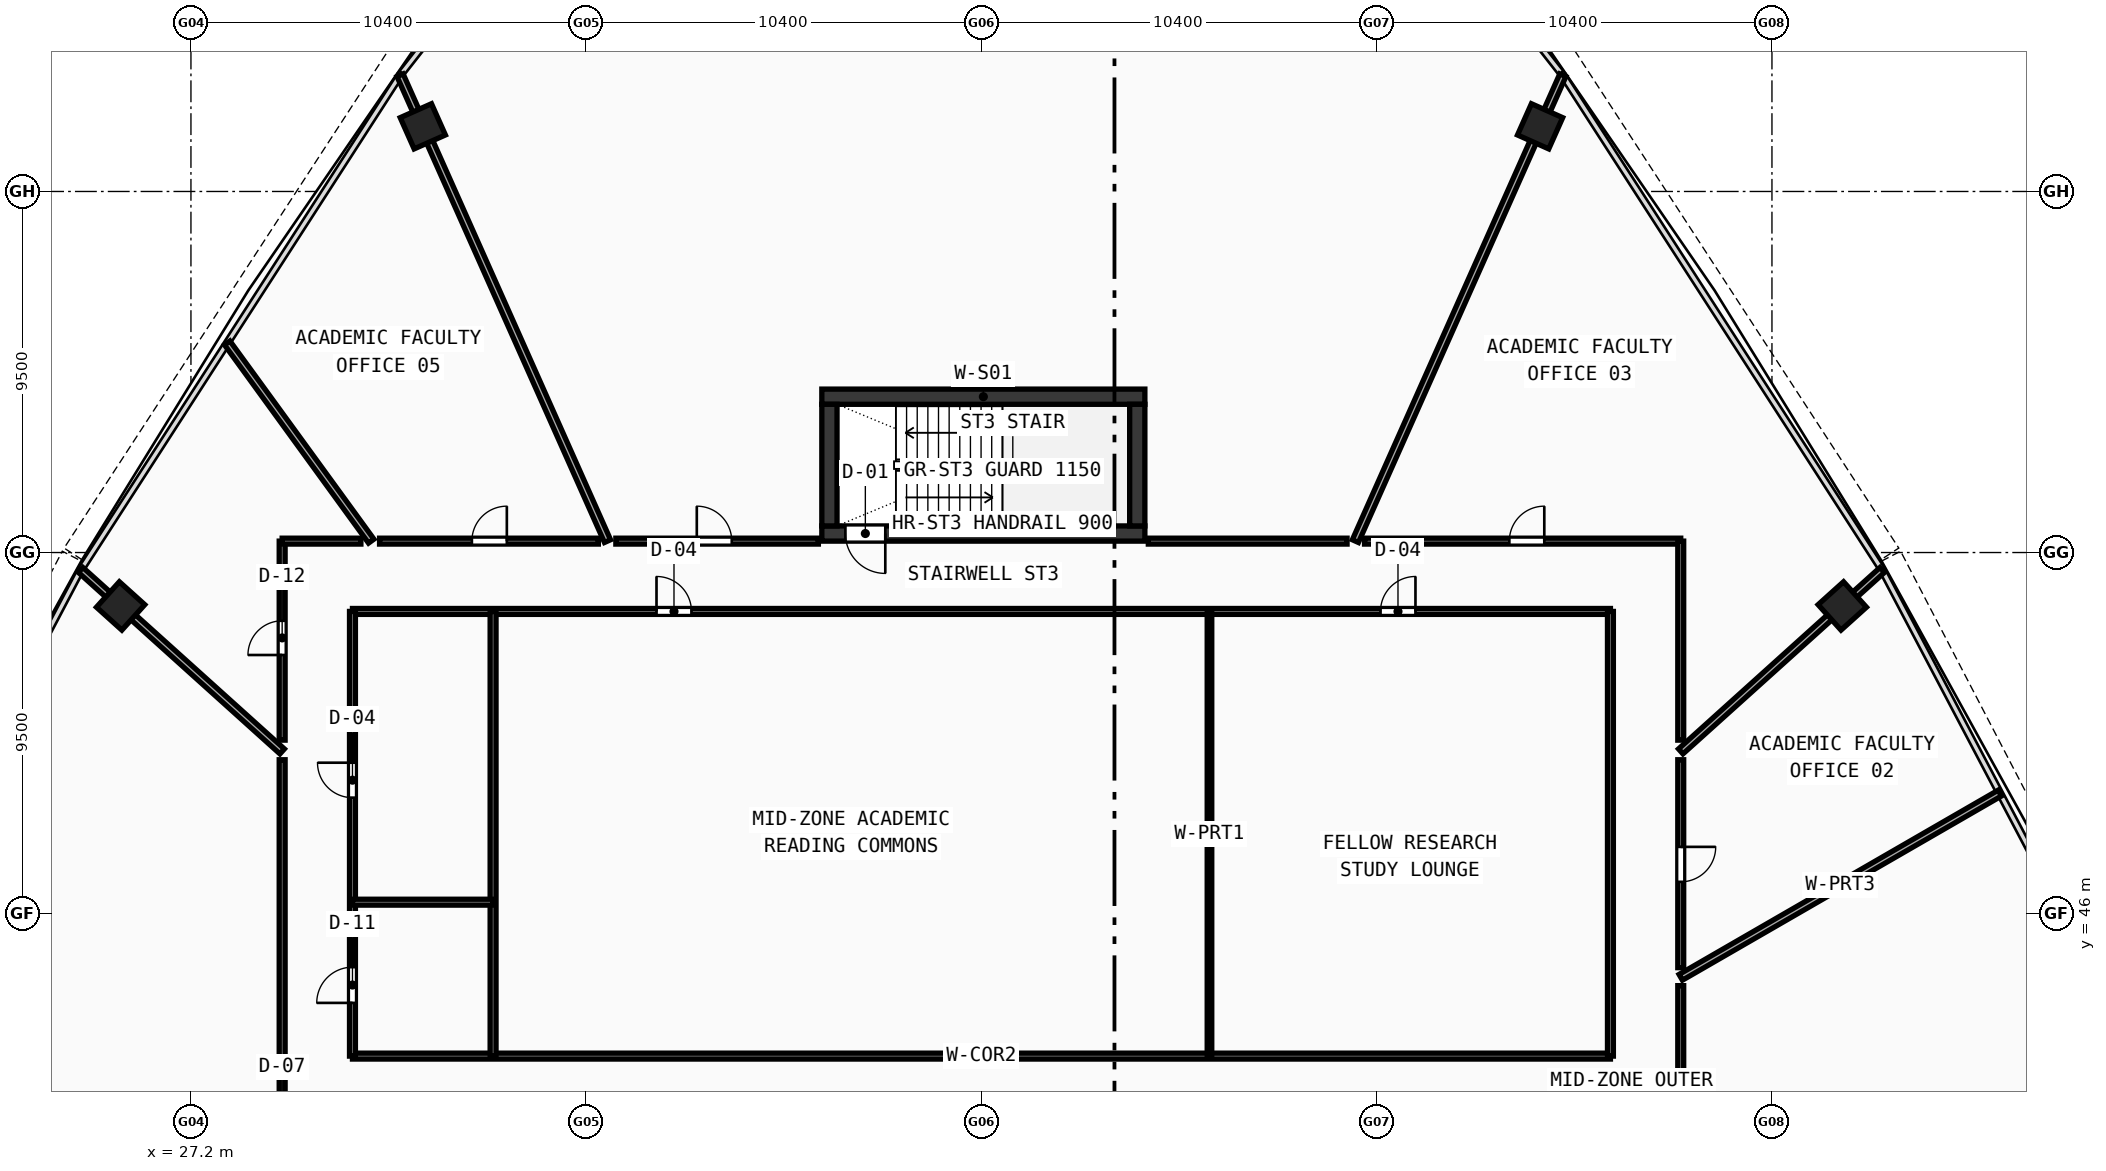
"""IFC4 building model, lengths in metres.
Left out: names, types, materials, properties, quantities, classifications, styles, units other than length and angle.
Written with IfcOpenShell. Run it as: python <this file> out.ifc"""

import sys

from ifc_helpers import new_model, si_unit, direction, frame, frame_2d, origin, origin_with_axes, origin_2d, place, context, subcontext, project, spatial, rectangle, hollow_rectangle, extrude, source, transform, mapped, element, fill, save


model = new_model("IFC4")
c1 = context("Model", 3, precision=1e-05, world=origin(), true_north=direction((0.0, 1.0)))
c2 = subcontext(c1, "Body", "Model", "MODEL_VIEW")
j1 = project(units=[si_unit("LENGTHUNIT", "METRE"), si_unit("PLANEANGLEUNIT", "RADIAN")], contexts=[c1])
p1 = place(None, origin())
s1 = spatial("IfcSite", under=j1, at=p1, CompositionType="ELEMENT")
p2 = place(p1, origin())
s2 = spatial("IfcBuilding", under=s1, at=p2, CompositionType="ELEMENT")
p3 = place(p2, frame((0.0, 0.0, 215.16)))
s3 = spatial("IfcBuildingStorey", under=s2, at=p3, CompositionType="ELEMENT", Elevation=215.16)
p4 = place(p3, frame((43.8, 59.6, 0.0), z_axis=(0.0, 0.0, 1.0), x_axis=(1.0, 0.0, 0.0)))
e1 = element("IfcWall", 1, at=p4, inside=s3, PredefinedType="SHEAR", context=c2, shape_type="SweptSolid", body=[
    extrude(rectangle(XDim=8.5, YDim=0.4, at=frame_2d((4.25, 0.0))), origin(), (0.0, 0.0, 1.0), 3.52),
])
p5 = place(p3, frame((43.8, 56.0, 0.0), z_axis=(0.0, 0.0, 1.0), x_axis=(1.0, 0.0, 0.0)))
e2 = element("IfcWall", 2, at=p5, inside=s3, PredefinedType="SHEAR", context=c2, shape_type="SweptSolid", body=[
    extrude(rectangle(XDim=8.5, YDim=0.4, at=frame_2d((4.25, 0.0))), origin(), (0.0, 0.0, 1.0), 3.52),
])
p6 = place(p5, frame((0.62, 0.0, 0.0)))
e3 = element("IfcOpeningElement", 3, at=p6, cuts=e2, PredefinedType="OPENING", context=c2, shape_type="SweptSolid", body=[
    extrude(rectangle(XDim=1.05, YDim=2.1, at=frame_2d((0.525, 1.05))), frame((0.0, 0.21, 0.0), z_axis=(0.0, -1.0, 0.0), x_axis=(1.0, 0.0, 0.0)), (0.0, 0.0, 1.0), 0.42),
])
for number, where, z_axis, x_axis in (
    (4, (44.0, 56.2, 0.0), (0.0, 0.0, 1.0), (0.0, 1.0, 0.0)),
    (5, (52.1, 56.2, 0.0), (0.0, 0.0, 1.0), (0.0, 1.0, 0.0)),
):
    element("IfcWall", number, at=place(p3, frame(where, z_axis=z_axis, x_axis=x_axis)), inside=s3, PredefinedType="SHEAR", context=c2, shape_type="SweptSolid", body=[
        extrude(rectangle(XDim=3.2, YDim=0.4, at=frame_2d((1.6, 0.0))), origin(), (0.0, 0.0, 1.0), 3.52),
    ])
m1 = source(origin(), c2, "Body", "SweptSolid", [
    extrude(hollow_rectangle(XDim=0.9, YDim=0.9, WallThickness=0.036, at=origin_2d()), origin(), (0.0, 0.0, 1.0), 3.78),
])
for number, where, z_axis, x_axis in (
    (6, (70.651, 54.095, -0.26), (0.0, 0.0, 1.0), (-0.669, 0.743, 0.0)),
    (7, (62.699, 66.715, -0.26), (0.0, 0.0, 1.0), (-0.914, 0.407, 0.0)),
    (8, (33.301, 66.715, -0.26), (0.0, 0.0, 1.0), (-0.914, -0.407, 0.0)),
    (9, (25.349, 54.095, -0.26), (0.0, 0.0, 1.0), (-0.669, -0.743, 0.0)),
):
    element("IfcColumn", number, at=place(p3, frame(where, z_axis=z_axis, x_axis=x_axis)), inside=s3, PredefinedType="COLUMN", context=c2, shape_type="MappedRepresentation", body=[
        mapped(m1, transform((0.0, 0.0, 0.0), scale=1.0)),
    ])
p7 = place(p3, frame((31.45, 42.25, 0.0), z_axis=(0.0, 0.0, 1.0), x_axis=(1.0, 0.0, 0.0)))
e10 = element("IfcWall", 10, at=p7, inside=s3, PredefinedType="PARTITIONING", context=c2, shape_type="SweptSolid", body=[
    extrude(rectangle(XDim=33.1, YDim=0.155, at=frame_2d((16.55, 0.0))), origin(), (0.0, 0.0, 1.0), 2.87),
])
p8 = place(p3, frame((31.45, 53.95, 0.0), z_axis=(0.0, 0.0, 1.0), x_axis=(1.0, 0.0, 0.0)))
e11 = element("IfcWall", 11, at=p8, inside=s3, PredefinedType="PARTITIONING", context=c2, shape_type="SweptSolid", body=[
    extrude(rectangle(XDim=33.1, YDim=0.155, at=frame_2d((16.55, 0.0))), origin(), (0.0, 0.0, 1.0), 2.87),
])
p9 = place(p8, frame((8.0, 0.0, 0.0)))
e12 = element("IfcOpeningElement", 12, at=p9, cuts=e11, PredefinedType="OPENING", context=c2, shape_type="SweptSolid", body=[
    extrude(rectangle(XDim=0.92, YDim=2.1, at=frame_2d((0.46, 1.05))), frame((0.0, 0.087, 0.0), z_axis=(0.0, -1.0, 0.0), x_axis=(1.0, 0.0, 0.0)), (0.0, 0.0, 1.0), 0.175),
])
p10 = place(p8, frame((27.05, 0.0, 0.0)))
e13 = element("IfcOpeningElement", 13, at=p10, cuts=e11, PredefinedType="OPENING", context=c2, shape_type="SweptSolid", body=[
    extrude(rectangle(XDim=0.92, YDim=2.1, at=frame_2d((0.46, 1.05))), frame((0.0, 0.087, 0.0), z_axis=(0.0, -1.0, 0.0), x_axis=(1.0, 0.0, 0.0)), (0.0, 0.0, 1.0), 0.175),
])
p11 = place(p3, frame((31.45, 42.25, 0.0), z_axis=(0.0, 0.0, 1.0), x_axis=(0.0, 1.0, 0.0)))
e14 = element("IfcWall", 14, at=p11, inside=s3, PredefinedType="PARTITIONING", context=c2, shape_type="SweptSolid", body=[
    extrude(rectangle(XDim=11.7, YDim=0.155, at=frame_2d((5.85, 0.0))), origin(), (0.0, 0.0, 1.0), 2.87),
])
p12 = place(p11, frame((1.4, 0.0, 0.0)))
e15 = element("IfcOpeningElement", 15, at=p12, cuts=e14, PredefinedType="OPENING", context=c2, shape_type="SweptSolid", body=[
    extrude(rectangle(XDim=0.94, YDim=2.1, at=frame_2d((0.47, 1.05))), frame((0.0, 0.087, 0.0), z_axis=(0.0, -1.0, 0.0), x_axis=(1.0, 0.0, 0.0)), (0.0, 0.0, 1.0), 0.175),
])
p13 = place(p11, frame((6.8, 0.0, 0.0)))
e16 = element("IfcOpeningElement", 16, at=p13, cuts=e14, PredefinedType="OPENING", context=c2, shape_type="SweptSolid", body=[
    extrude(rectangle(XDim=0.92, YDim=2.1, at=frame_2d((0.46, 1.05))), frame((0.0, 0.087, 0.0), z_axis=(0.0, -1.0, 0.0), x_axis=(1.0, 0.0, 0.0)), (0.0, 0.0, 1.0), 0.175),
])
for number, where, z_axis, x_axis in (
    (17, (64.55, 42.25, 0.0), (0.0, 0.0, 1.0), (0.0, 1.0, 0.0)),
    (18, (35.15, 42.25, 0.0), (0.0, 0.0, 1.0), (0.0, 1.0, 0.0)),
):
    element("IfcWall", number, at=place(p3, frame(where, z_axis=z_axis, x_axis=x_axis)), inside=s3, PredefinedType="PARTITIONING", context=c2, shape_type="SweptSolid", body=[
        extrude(rectangle(XDim=11.7, YDim=0.155, at=frame_2d((5.85, 0.0))), origin(), (0.0, 0.0, 1.0), 2.87),
    ])
p14 = place(p3, frame((31.45, 46.3, 0.0), z_axis=(0.0, 0.0, 1.0), x_axis=(1.0, 0.0, 0.0)))
e19 = element("IfcWall", 19, at=p14, inside=s3, PredefinedType="PARTITIONING", context=c2, shape_type="SweptSolid", body=[
    extrude(rectangle(XDim=3.7, YDim=0.155, at=frame_2d((1.85, 0.0))), origin(), (0.0, 0.0, 1.0), 2.87),
])
p15 = place(p3, frame((54.0, 42.25, 0.0), z_axis=(0.0, 0.0, 1.0), x_axis=(0.0, 1.0, 0.0)))
e20 = element("IfcWall", 20, at=p15, inside=s3, PredefinedType="PARTITIONING", context=c2, shape_type="SweptSolid", body=[
    extrude(rectangle(XDim=11.7, YDim=0.12, at=frame_2d((5.85, 0.0))), origin(), (0.0, 0.0, 1.0), 2.87),
])
p16 = place(p3, frame((66.4, 44.323, 0.0), z_axis=(0.0, 0.0, 1.0), x_axis=(0.866029151995, 0.499993507853, 0.0)))
e21 = element("IfcWall", 21, at=p16, inside=s3, PredefinedType="PARTITIONING", context=c2, shape_type="SweptSolid", body=[
    extrude(rectangle(XDim=9.694, YDim=0.175, at=frame_2d((4.847, 0.0))), origin(), (0.0, 0.0, 1.0), 2.87),
])
p17 = place(p3, frame((66.4, 50.267, 0.0), z_axis=(0.0, 0.0, 1.0), x_axis=(0.743146095384, 0.669129195982, 0.0)))
e22 = element("IfcWall", 22, at=p17, inside=s3, PredefinedType="PARTITIONING", context=c2, shape_type="SweptSolid", body=[
    extrude(rectangle(XDim=7.135, YDim=0.175, at=frame_2d((3.567, 0.0))), origin(), (0.0, 0.0, 1.0), 2.87),
])
for number, where, z_axis, x_axis in (
    (23, (57.84, 55.8, 0.0), (0.0, 0.0, 1.0), (0.407, 0.914, 0.0)),
    (24, (38.16, 55.8, 0.0), (0.0, 0.0, 1.0), (-0.407, 0.914, 0.0)),
):
    element("IfcWall", number, at=place(p3, frame(where, z_axis=z_axis, x_axis=x_axis)), inside=s3, PredefinedType="PARTITIONING", context=c2, shape_type="SweptSolid", body=[
        extrude(rectangle(XDim=13.419, YDim=0.175, at=frame_2d((6.709, 0.0))), origin(), (0.0, 0.0, 1.0), 2.87),
    ])
p18 = place(p3, frame((31.943, 55.8, 0.0), z_axis=(0.0, 0.0, 1.0), x_axis=(-0.587786531485, 0.809016064986, 0.0)))
e25 = element("IfcWall", 25, at=p18, inside=s3, PredefinedType="PARTITIONING", context=c2, shape_type="SweptSolid", body=[
    extrude(rectangle(XDim=6.446, YDim=0.175, at=frame_2d((3.223, 0.0))), origin(), (0.0, 0.0, 1.0), 2.87),
])
p19 = place(p3, frame((29.6, 50.267, 0.0), z_axis=(0.0, 0.0, 1.0), x_axis=(-0.743146095384, 0.669129195982, 0.0)))
e26 = element("IfcWall", 26, at=p19, inside=s3, PredefinedType="PARTITIONING", context=c2, shape_type="SweptSolid", body=[
    extrude(rectangle(XDim=7.135, YDim=0.175, at=frame_2d((3.567, 0.0))), origin(), (0.0, 0.0, 1.0), 2.87),
])
p20 = place(p3, frame((29.6, 30.675, 0.0), z_axis=(0.0, 0.0, 1.0), x_axis=(0.0, 1.0, 0.0)))
e27 = element("IfcWall", 27, at=p20, inside=s3, PredefinedType="PARTITIONING", context=c2, shape_type="SweptSolid", body=[
    extrude(rectangle(XDim=19.372, YDim=0.155, at=frame_2d((9.686, 0.0))), origin(), (0.0, 0.0, 1.0), 2.87),
])
p21 = place(p20, frame((9.211, 0.0, 0.0)))
e28 = element("IfcOpeningElement", 28, at=p21, cuts=e27, PredefinedType="OPENING", context=c2, shape_type="SweptSolid", body=[
    extrude(rectangle(XDim=0.96, YDim=2.12, at=frame_2d((0.48, 1.06))), frame((0.0, 0.087, 0.0), z_axis=(0.0, -1.0, 0.0), x_axis=(1.0, 0.0, 0.0)), (0.0, 0.0, 1.0), 0.175),
])
p22 = place(p3, frame((29.6, 50.563, 0.0), z_axis=(0.0, 0.0, 1.0), x_axis=(0.0, 1.0, 0.0)))
e29 = element("IfcWall", 29, at=p22, inside=s3, PredefinedType="PARTITIONING", context=c2, shape_type="SweptSolid", body=[
    extrude(rectangle(XDim=5.237, YDim=0.155, at=frame_2d((2.618, 0.0))), origin(), (0.0, 0.0, 1.0), 3.52),
])
p23 = place(p22, frame((2.24, 0.0, 0.0)))
e30 = element("IfcOpeningElement", 30, at=p23, cuts=e29, PredefinedType="OPENING", context=c2, shape_type="SweptSolid", body=[
    extrude(rectangle(XDim=0.9, YDim=2.08, at=frame_2d((0.45, 1.04))), frame((0.0, 0.087, 0.0), z_axis=(0.0, -1.0, 0.0), x_axis=(1.0, 0.0, 0.0)), (0.0, 0.0, 1.0), 0.175),
])
p24 = place(p3, frame((29.6, 55.8, 0.0), z_axis=(0.0, 0.0, 1.0), x_axis=(1.0, 0.0, 0.0)))
e31 = element("IfcWall", 31, at=p24, inside=s3, PredefinedType="PARTITIONING", context=c2, shape_type="SweptSolid", body=[
    extrude(rectangle(XDim=2.071, YDim=0.155, at=frame_2d((1.036, 0.0))), origin(), (0.0, 0.0, 1.0), 3.52),
])
p25 = place(p3, frame((32.163, 55.8, 0.0), z_axis=(0.0, 0.0, 1.0), x_axis=(1.0, 0.0, 0.0)))
e32 = element("IfcWall", 32, at=p25, inside=s3, PredefinedType="PARTITIONING", context=c2, shape_type="SweptSolid", body=[
    extrude(rectangle(XDim=5.757, YDim=0.155, at=frame_2d((2.878, 0.0))), origin(), (0.0, 0.0, 1.0), 3.12),
])
p26 = place(p25, frame((2.429, 0.0, 0.0)))
e33 = element("IfcOpeningElement", 33, at=p26, cuts=e32, PredefinedType="OPENING", context=c2, shape_type="SweptSolid", body=[
    extrude(rectangle(XDim=0.92, YDim=2.1, at=frame_2d((0.46, 1.05))), frame((0.0, 0.087, 0.0), z_axis=(0.0, -1.0, 0.0), x_axis=(1.0, 0.0, 0.0)), (0.0, 0.0, 1.0), 0.175),
])
p27 = place(p3, frame((38.38, 55.8, 0.0), z_axis=(0.0, 0.0, 1.0), x_axis=(1.0, 0.0, 0.0)))
e34 = element("IfcWall", 34, at=p27, inside=s3, PredefinedType="PARTITIONING", context=c2, shape_type="SweptSolid", body=[
    extrude(rectangle(XDim=5.329, YDim=0.155, at=frame_2d((2.665, 0.0))), origin(), (0.0, 0.0, 1.0), 2.87),
])
p28 = place(p27, frame((2.13, 0.0, 0.0)))
e35 = element("IfcOpeningElement", 35, at=p28, cuts=e34, PredefinedType="OPENING", context=c2, shape_type="SweptSolid", body=[
    extrude(rectangle(XDim=0.92, YDim=2.1, at=frame_2d((0.46, 1.05))), frame((0.0, 0.087, 0.0), z_axis=(0.0, -1.0, 0.0), x_axis=(1.0, 0.0, 0.0)), (0.0, 0.0, 1.0), 0.175),
])
p29 = place(p3, frame((52.391, 55.8, 0.0), z_axis=(0.0, 0.0, 1.0), x_axis=(1.0, 0.0, 0.0)))
e36 = element("IfcWall", 36, at=p29, inside=s3, PredefinedType="PARTITIONING", context=c2, shape_type="SweptSolid", body=[
    extrude(rectangle(XDim=5.229, YDim=0.155, at=frame_2d((2.614, 0.0))), origin(), (0.0, 0.0, 1.0), 2.87),
])
p30 = place(p3, frame((58.08, 55.8, 0.0), z_axis=(0.0, 0.0, 1.0), x_axis=(1.0, 0.0, 0.0)))
e37 = element("IfcWall", 37, at=p30, inside=s3, PredefinedType="PARTITIONING", context=c2, shape_type="SweptSolid", body=[
    extrude(rectangle(XDim=8.32, YDim=0.155, at=frame_2d((4.16, 0.0))), origin(), (0.0, 0.0, 1.0), 3.12),
])
p31 = place(p30, frame((3.809, 0.0, 0.0)))
e38 = element("IfcOpeningElement", 38, at=p31, cuts=e37, PredefinedType="OPENING", context=c2, shape_type="SweptSolid", body=[
    extrude(rectangle(XDim=0.92, YDim=2.1, at=frame_2d((0.46, 1.05))), frame((0.0, 0.087, 0.0), z_axis=(0.0, -1.0, 0.0), x_axis=(1.0, 0.0, 0.0)), (0.0, 0.0, 1.0), 0.175),
])
p32 = place(p3, frame((66.4, 55.8, 0.0), z_axis=(0.0, 0.0, 1.0), x_axis=(0.0, -1.0, 0.0)))
e39 = element("IfcWall", 39, at=p32, inside=s3, PredefinedType="PARTITIONING", context=c2, shape_type="SweptSolid", body=[
    extrude(rectangle(XDim=5.237, YDim=0.155, at=frame_2d((2.618, 0.0))), origin(), (0.0, 0.0, 1.0), 3.52),
])
p33 = place(p3, frame((66.4, 50.048, 0.0), z_axis=(0.0, 0.0, 1.0), x_axis=(0.0, -1.0, 0.0)))
e40 = element("IfcWall", 40, at=p33, inside=s3, PredefinedType="PARTITIONING", context=c2, shape_type="SweptSolid", body=[
    extrude(rectangle(XDim=5.47, YDim=0.155, at=frame_2d((2.735, 0.0))), origin(), (0.0, 0.0, 1.0), 2.87),
])
p34 = place(p33, frame((2.292, 0.0, 0.0)))
e41 = element("IfcOpeningElement", 41, at=p34, cuts=e40, PredefinedType="OPENING", context=c2, shape_type="SweptSolid", body=[
    extrude(rectangle(XDim=0.92, YDim=2.1, at=frame_2d((0.46, 1.05))), frame((0.0, 0.087, 0.0), z_axis=(0.0, -1.0, 0.0), x_axis=(1.0, 0.0, 0.0)), (0.0, 0.0, 1.0), 0.175),
])
p35 = place(p3, frame((66.4, 44.104, 0.0), z_axis=(0.0, 0.0, 1.0), x_axis=(0.0, -1.0, 0.0)))
e42 = element("IfcWall", 42, at=p35, inside=s3, PredefinedType="PARTITIONING", context=c2, shape_type="SweptSolid", body=[
    extrude(rectangle(XDim=13.428, YDim=0.155, at=frame_2d((6.714, 0.0))), origin(), (0.0, 0.0, 1.0), 2.87),
])
p36 = place(p35, frame((6.239, 0.0, 0.0)))
e43 = element("IfcOpeningElement", 43, at=p36, cuts=e42, PredefinedType="OPENING", context=c2, shape_type="SweptSolid", body=[
    extrude(rectangle(XDim=0.96, YDim=2.12, at=frame_2d((0.48, 1.06))), frame((0.0, 0.087, 0.0), z_axis=(0.0, -1.0, 0.0), x_axis=(1.0, 0.0, 0.0)), (0.0, 0.0, 1.0), 0.175),
])
m2 = source(origin(), c2, "Body", "SweptSolid", [
    extrude(rectangle(XDim=1.05, YDim=2.1, at=frame_2d((0.525, 1.05))), frame((0.0, 0.025, 0.0), z_axis=(0.0, -1.0, 0.0), x_axis=(1.0, 0.0, 0.0)), (0.0, 0.0, 1.0), 0.05),
])
p37 = place(p6, frame((1.05, 0.0, 0.0), z_axis=(0.0, 0.0, 1.0), x_axis=(-1.0, 0.0, 0.0)))
e44 = element("IfcDoor", 44, at=p37, inside=s3, OperationType="SINGLE_SWING_LEFT", PredefinedType="DOOR", context=c2, shape_type="MappedRepresentation", body=[
    mapped(m2, transform((0.0, 0.0, 0.0), scale=1.0)),
])
fill(e3, e44)
m3 = source(origin(), c2, "Body", "SweptSolid", [
    extrude(rectangle(XDim=0.94, YDim=2.1, at=frame_2d((0.47, 1.05))), frame((0.0, 0.025, 0.0), z_axis=(0.0, -1.0, 0.0), x_axis=(1.0, 0.0, 0.0)), (0.0, 0.0, 1.0), 0.05),
])
p38 = place(p12, origin_with_axes())
e45 = element("IfcDoor", 45, at=p38, inside=s3, OperationType="SINGLE_SWING_LEFT", PredefinedType="DOOR", context=c2, shape_type="MappedRepresentation", body=[
    mapped(m3, transform((0.0, 0.0, 0.0), scale=1.0)),
])
fill(e15, e45)
m4 = source(origin(), c2, "Body", "SweptSolid", [
    extrude(rectangle(XDim=0.92, YDim=2.1, at=frame_2d((0.46, 1.05))), frame((0.0, 0.025, 0.0), z_axis=(0.0, -1.0, 0.0), x_axis=(1.0, 0.0, 0.0)), (0.0, 0.0, 1.0), 0.05),
])
p39 = place(p13, origin_with_axes())
e46 = element("IfcDoor", 46, at=p39, inside=s3, OperationType="SINGLE_SWING_RIGHT", PredefinedType="DOOR", context=c2, shape_type="MappedRepresentation", body=[
    mapped(m4, transform((0.0, 0.0, 0.0), scale=1.0)),
])
fill(e16, e46)
p40 = place(p9, origin_with_axes())
e47 = element("IfcDoor", 47, at=p40, inside=s3, OperationType="SINGLE_SWING_LEFT", PredefinedType="DOOR", context=c2, shape_type="MappedRepresentation", body=[
    mapped(m4, transform((0.0, 0.0, 0.0), scale=1.0)),
])
fill(e12, e47)
p41 = place(p10, origin_with_axes())
e48 = element("IfcDoor", 48, at=p41, inside=s3, OperationType="SINGLE_SWING_RIGHT", PredefinedType="DOOR", context=c2, shape_type="MappedRepresentation", body=[
    mapped(m4, transform((0.0, 0.0, 0.0), scale=1.0)),
])
fill(e13, e48)
p42 = place(p34, origin_with_axes())
e49 = element("IfcDoor", 49, at=p42, inside=s3, OperationType="SINGLE_SWING_LEFT", PredefinedType="DOOR", context=c2, shape_type="MappedRepresentation", body=[
    mapped(m4, transform((0.0, 0.0, 0.0), scale=1.0)),
])
fill(e41, e49)
p43 = place(p31, origin_with_axes())
e50 = element("IfcDoor", 50, at=p43, inside=s3, OperationType="SINGLE_SWING_RIGHT", PredefinedType="DOOR", context=c2, shape_type="MappedRepresentation", body=[
    mapped(m4, transform((0.0, 0.0, 0.0), scale=1.0)),
])
fill(e38, e50)
p44 = place(p28, origin_with_axes())
e51 = element("IfcDoor", 51, at=p44, inside=s3, OperationType="SINGLE_SWING_LEFT", PredefinedType="DOOR", context=c2, shape_type="MappedRepresentation", body=[
    mapped(m4, transform((0.0, 0.0, 0.0), scale=1.0)),
])
fill(e35, e51)
p45 = place(p26, origin_with_axes())
e52 = element("IfcDoor", 52, at=p45, inside=s3, OperationType="SINGLE_SWING_RIGHT", PredefinedType="DOOR", context=c2, shape_type="MappedRepresentation", body=[
    mapped(m4, transform((0.0, 0.0, 0.0), scale=1.0)),
])
fill(e33, e52)
m5 = source(origin(), c2, "Body", "SweptSolid", [
    extrude(rectangle(XDim=0.9, YDim=2.08, at=frame_2d((0.45, 1.04))), frame((0.0, 0.025, 0.0), z_axis=(0.0, -1.0, 0.0), x_axis=(1.0, 0.0, 0.0)), (0.0, 0.0, 1.0), 0.05),
])
p46 = place(p23, origin_with_axes())
e53 = element("IfcDoor", 53, at=p46, inside=s3, OperationType="SINGLE_SWING_LEFT", PredefinedType="DOOR", context=c2, shape_type="MappedRepresentation", body=[
    mapped(m5, transform((0.0, 0.0, 0.0), scale=1.0)),
])
fill(e30, e53)
save(model, sys.argv[1])
